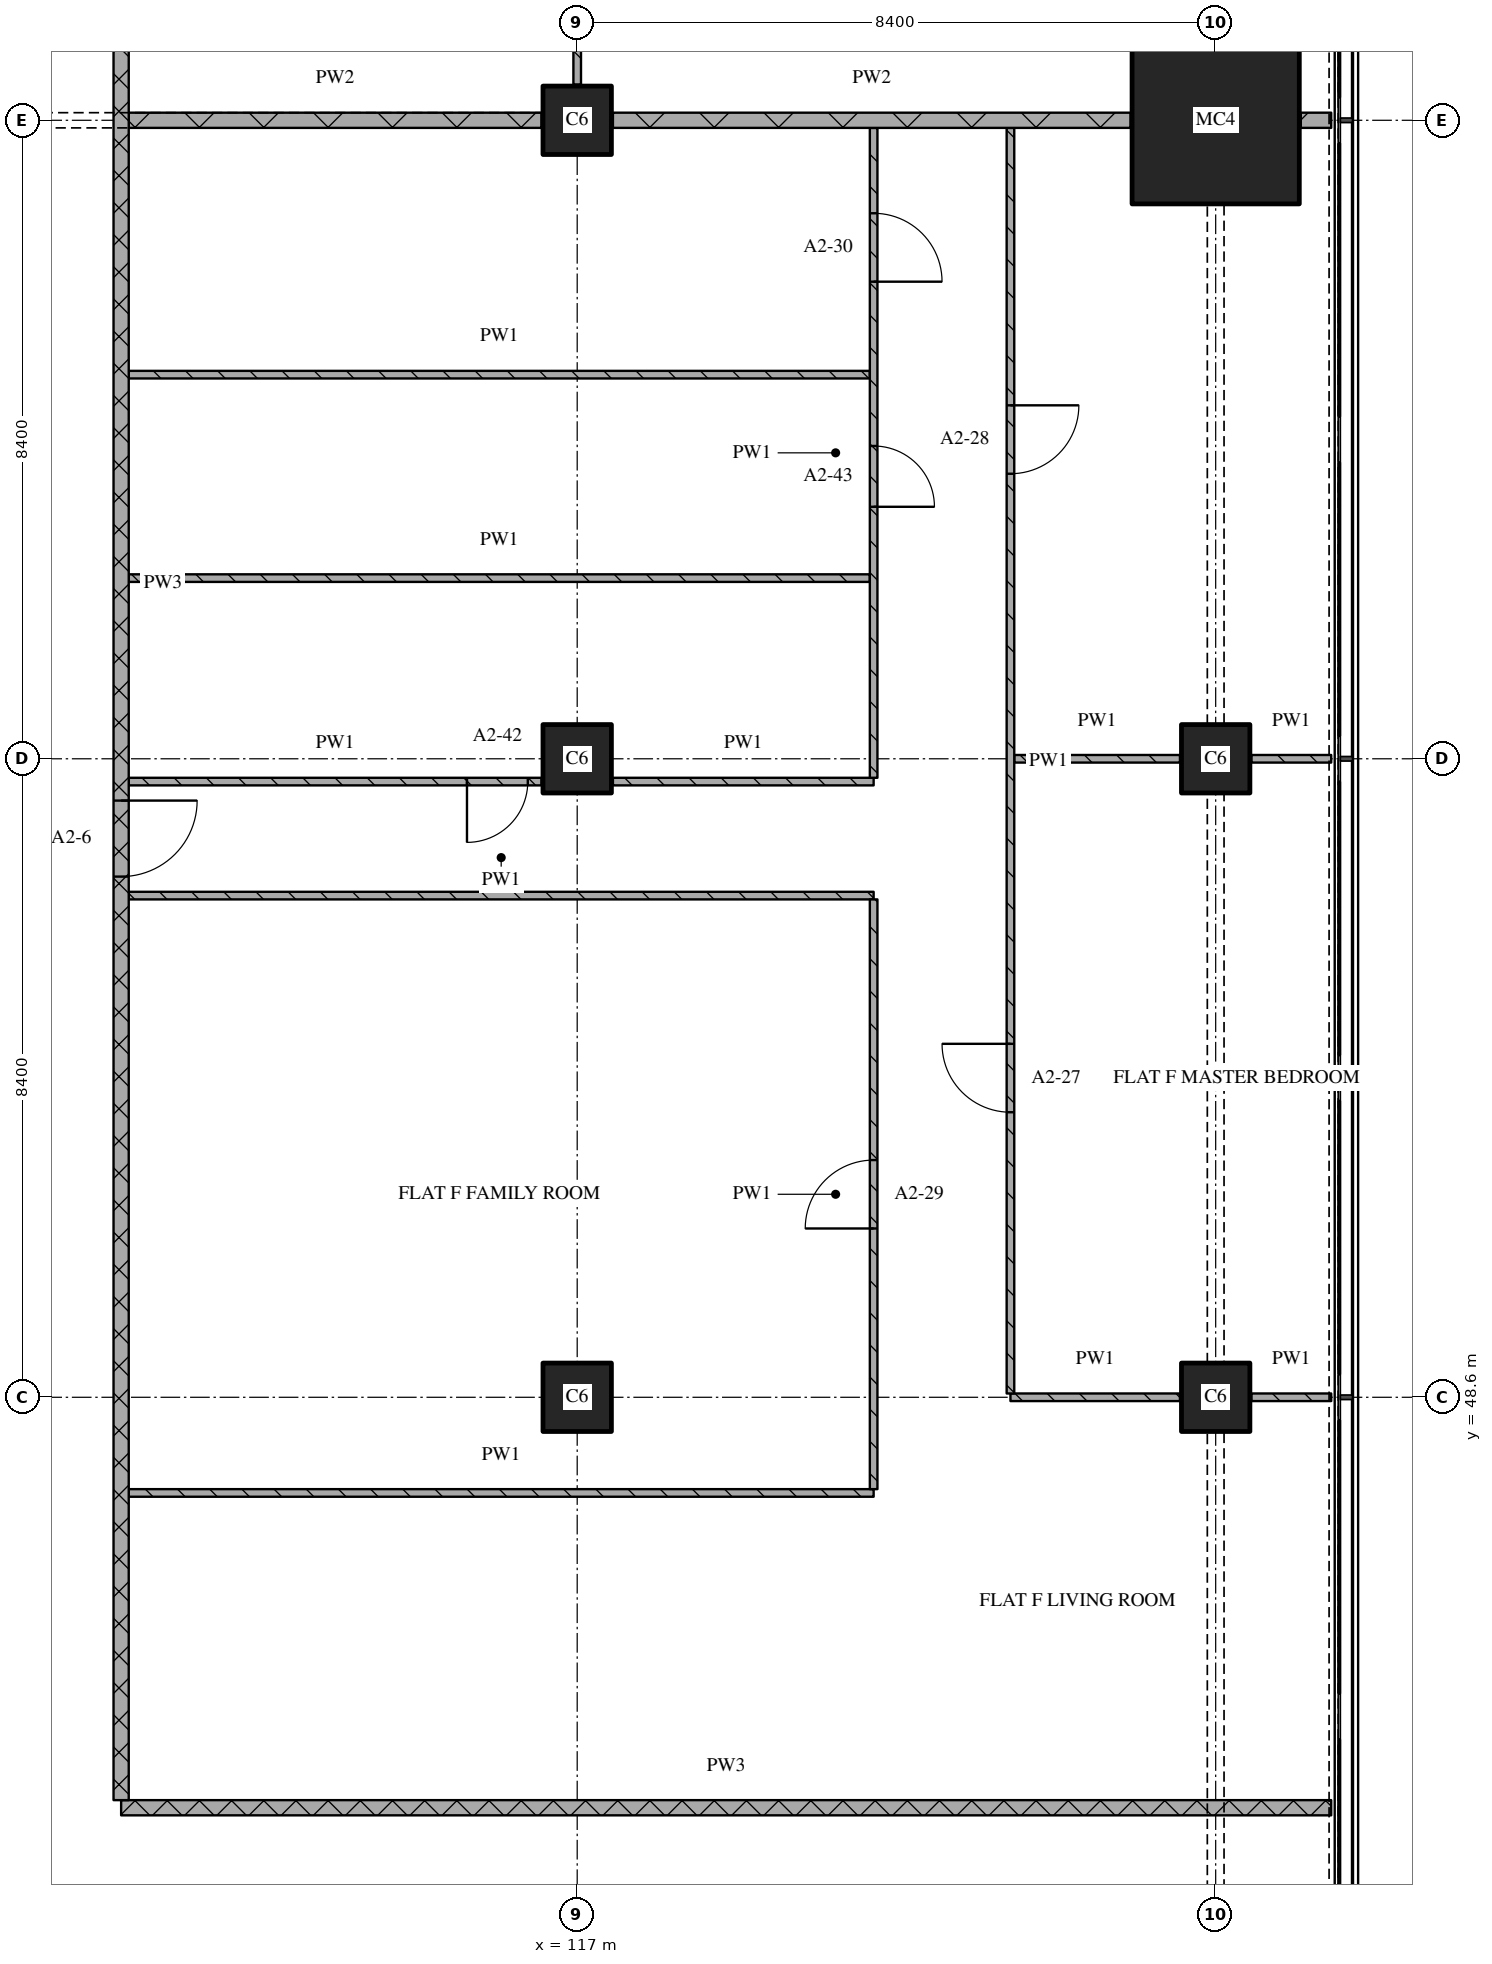
"""IFC4 building model, lengths in metres.
Left out: names, types, materials, properties, quantities, classifications, styles, units other than length and angle.
Written with IfcOpenShell. Run it as: python <this file> out.ifc"""

import sys

from ifc_helpers import new_model, si_unit, direction, frame, frame_2d, origin, origin_2d, place, context, subcontext, project, spatial, rectangle, extrude, element, fill, save


model = new_model("IFC4")
c1 = context("Model", 3, precision=1e-05, world=origin(), true_north=direction((0.0, 1.0)))
c2 = subcontext(c1, "Body", "Model", "MODEL_VIEW")
j1 = project(units=[si_unit("LENGTHUNIT", "METRE"), si_unit("PLANEANGLEUNIT", "RADIAN")], contexts=[c1])
p1 = place(None, origin())
s1 = spatial("IfcSite", under=j1, at=p1, CompositionType="ELEMENT")
p2 = place(p1, origin())
s2 = spatial("IfcBuilding", under=s1, at=p2, CompositionType="ELEMENT")
p3 = place(p2, frame((0.0, 0.0, 55.2)))
s3 = spatial("IfcBuildingStorey", under=s2, at=p3, CompositionType="ELEMENT", Elevation=55.2)
for number, where, z_axis, x_axis in (
    (1, (117.0, 48.6, 0.0), (0.0, 0.0, 1.0), (1.0, 0.0, 0.0)),
    (2, (117.0, 57.0, 0.0), (0.0, 0.0, 1.0), (1.0, 0.0, 0.0)),
    (3, (117.0, 65.4, 0.0), (0.0, 0.0, 1.0), (1.0, 0.0, 0.0)),
    (4, (125.4, 48.6, 0.0), (0.0, 0.0, 1.0), (1.0, 0.0, 0.0)),
    (5, (125.4, 57.0, 0.0), (0.0, 0.0, 1.0), (1.0, 0.0, 0.0)),
):
    element("IfcColumn", number, at=place(p3, frame(where, z_axis=z_axis, x_axis=x_axis)), inside=s3, PredefinedType="COLUMN", context=c2, shape_type="SweptSolid", body=[
        extrude(rectangle(XDim=0.9, YDim=0.9, at=origin_2d()), origin(), (0.0, 0.0, 1.0), 3.6),
    ])
p4 = place(p3, frame((125.4, 65.4, 0.0), z_axis=(0.0, 0.0, 1.0), x_axis=(1.0, 0.0, 0.0)))
e6 = element("IfcColumn", 6, at=p4, inside=s3, PredefinedType="COLUMN", context=c2, shape_type="SweptSolid", body=[
    extrude(rectangle(XDim=2.2, YDim=2.2, at=origin_2d()), origin(), (0.0, 0.0, 1.0), 3.6),
])
p5 = place(p3, frame((111.0, 43.2, 0.0), z_axis=(0.0, 0.0, 1.0), x_axis=(1.0, 0.0, 0.0)))
e7 = element("IfcWall", 7, at=p5, inside=s3, PredefinedType="PARTITIONING", context=c2, shape_type="SweptSolid", body=[
    extrude(rectangle(XDim=15.92, YDim=0.2, at=frame_2d((7.96, 0.0))), origin(), (0.0, 0.0, 1.0), 3.32),
])
p6 = place(p3, frame((111.1, 47.341, 0.0), z_axis=(0.0, 0.0, 1.0), x_axis=(1.0, 0.0, 0.0)))
e8 = element("IfcWall", 8, at=p6, inside=s3, PredefinedType="PARTITIONING", context=c2, shape_type="SweptSolid", body=[
    extrude(rectangle(XDim=9.8, YDim=0.1, at=frame_2d((4.9, 0.0))), origin(), (0.0, 0.0, 1.0), 3.32),
])
p7 = place(p3, frame((122.7, 48.6, 0.0), z_axis=(0.0, 0.0, 1.0), x_axis=(1.0, 0.0, 0.0)))
e9 = element("IfcWall", 9, at=p7, inside=s3, PredefinedType="PARTITIONING", context=c2, shape_type="SweptSolid", body=[
    extrude(rectangle(XDim=2.23, YDim=0.1, at=frame_2d((1.115, 0.0))), origin(), (0.0, 0.0, 1.0), 3.32),
])
p8 = place(p3, frame((125.87, 48.6, 0.0), z_axis=(0.0, 0.0, 1.0), x_axis=(1.0, 0.0, 0.0)))
e10 = element("IfcWall", 10, at=p8, inside=s3, PredefinedType="PARTITIONING", context=c2, shape_type="SweptSolid", body=[
    extrude(rectangle(XDim=1.05, YDim=0.1, at=frame_2d((0.525, 0.0))), origin(), (0.0, 0.0, 1.0), 3.32),
])
p9 = place(p3, frame((111.1, 55.2, 0.0), z_axis=(0.0, 0.0, 1.0), x_axis=(1.0, 0.0, 0.0)))
e11 = element("IfcWall", 11, at=p9, inside=s3, PredefinedType="PARTITIONING", context=c2, shape_type="SweptSolid", body=[
    extrude(rectangle(XDim=9.8, YDim=0.1, at=frame_2d((4.9, 0.0))), origin(), (0.0, 0.0, 1.0), 3.32),
])
p10 = place(p3, frame((111.1, 56.7, 0.0), z_axis=(0.0, 0.0, 1.0), x_axis=(1.0, 0.0, 0.0)))
e12 = element("IfcWall", 12, at=p10, inside=s3, PredefinedType="PARTITIONING", context=c2, shape_type="SweptSolid", body=[
    extrude(rectangle(XDim=5.43, YDim=0.1, at=frame_2d((2.715, 0.0))), origin(), (0.0, 0.0, 1.0), 3.32),
])
p11 = place(p10, frame((4.45, 0.0, 0.0)))
e13 = element("IfcOpeningElement", 13, at=p11, cuts=e12, PredefinedType="OPENING", context=c2, shape_type="SweptSolid", body=[
    extrude(rectangle(XDim=0.8, YDim=2.1, at=frame_2d((0.4, 1.05))), frame((0.0, 0.06, 0.0), z_axis=(0.0, -1.0, 0.0), x_axis=(1.0, 0.0, 0.0)), (0.0, 0.0, 1.0), 0.12),
])
p12 = place(p3, frame((117.47, 56.7, 0.0), z_axis=(0.0, 0.0, 1.0), x_axis=(1.0, 0.0, 0.0)))
e14 = element("IfcWall", 14, at=p12, inside=s3, PredefinedType="PARTITIONING", context=c2, shape_type="SweptSolid", body=[
    extrude(rectangle(XDim=3.43, YDim=0.1, at=frame_2d((1.715, 0.0))), origin(), (0.0, 0.0, 1.0), 3.32),
])
p13 = place(p3, frame((122.75, 57.0, 0.0), z_axis=(0.0, 0.0, 1.0), x_axis=(1.0, 0.0, 0.0)))
e15 = element("IfcWall", 15, at=p13, inside=s3, PredefinedType="PARTITIONING", context=c2, shape_type="SweptSolid", body=[
    extrude(rectangle(XDim=2.18, YDim=0.1, at=frame_2d((1.09, 0.0))), origin(), (0.0, 0.0, 1.0), 3.32),
])
p14 = place(p3, frame((125.87, 57.0, 0.0), z_axis=(0.0, 0.0, 1.0), x_axis=(1.0, 0.0, 0.0)))
e16 = element("IfcWall", 16, at=p14, inside=s3, PredefinedType="PARTITIONING", context=c2, shape_type="SweptSolid", body=[
    extrude(rectangle(XDim=1.05, YDim=0.1, at=frame_2d((0.525, 0.0))), origin(), (0.0, 0.0, 1.0), 3.32),
])
for number, where, z_axis, x_axis in (
    (17, (111.1, 59.377, 0.0), (0.0, 0.0, 1.0), (1.0, 0.0, 0.0)),
    (18, (111.1, 62.053, 0.0), (0.0, 0.0, 1.0), (1.0, 0.0, 0.0)),
):
    element("IfcWall", number, at=place(p3, frame(where, z_axis=z_axis, x_axis=x_axis)), inside=s3, PredefinedType="PARTITIONING", context=c2, shape_type="SweptSolid", body=[
        extrude(rectangle(XDim=9.75, YDim=0.1, at=frame_2d((4.875, 0.0))), origin(), (0.0, 0.0, 1.0), 3.32),
    ])
p15 = place(p3, frame((111.1, 65.4, 0.0), z_axis=(0.0, 0.0, 1.0), x_axis=(1.0, 0.0, 0.0)))
e19 = element("IfcWall", 19, at=p15, inside=s3, PredefinedType="PARTITIONING", context=c2, shape_type="SweptSolid", body=[
    extrude(rectangle(XDim=5.43, YDim=0.2, at=frame_2d((2.715, 0.0))), origin(), (0.0, 0.0, 1.0), 2.82),
])
p16 = place(p3, frame((117.47, 65.4, 0.0), z_axis=(0.0, 0.0, 1.0), x_axis=(1.0, 0.0, 0.0)))
e20 = element("IfcWall", 20, at=p16, inside=s3, PredefinedType="PARTITIONING", context=c2, shape_type="SweptSolid", body=[
    extrude(rectangle(XDim=6.81, YDim=0.2, at=frame_2d((3.405, 0.0))), origin(), (0.0, 0.0, 1.0), 3.32),
])
p17 = place(p3, frame((126.52, 65.4, 0.0), z_axis=(0.0, 0.0, 1.0), x_axis=(1.0, 0.0, 0.0)))
e21 = element("IfcWall", 21, at=p17, inside=s3, PredefinedType="PARTITIONING", context=c2, shape_type="SweptSolid", body=[
    extrude(rectangle(XDim=0.4, YDim=0.2, at=frame_2d((0.2, 0.0))), origin(), (0.0, 0.0, 1.0), 3.32),
])
p18 = place(p3, frame((111.0, 75.32, 0.0), z_axis=(0.0, 0.0, 1.0), x_axis=(0.0, -1.0, 0.0)))
e22 = element("IfcWall", 22, at=p18, inside=s3, PredefinedType="PARTITIONING", context=c2, shape_type="SweptSolid", body=[
    extrude(rectangle(XDim=32.02, YDim=0.2, at=frame_2d((16.01, 0.0))), origin(), (0.0, 0.0, 1.0), 3.32),
])
p19 = place(p18, frame((4.47, 0.0, 0.0)))
e23 = element("IfcOpeningElement", 23, at=p19, cuts=e22, PredefinedType="OPENING", context=c2, shape_type="SweptSolid", body=[
    extrude(rectangle(XDim=1.0, YDim=2.1, at=frame_2d((0.5, 1.05))), frame((0.0, 0.11, 0.0), z_axis=(0.0, -1.0, 0.0), x_axis=(1.0, 0.0, 0.0)), (0.0, 0.0, 1.0), 0.22),
])
p20 = place(p18, frame((18.87, 0.0, 0.0)))
e24 = element("IfcOpeningElement", 24, at=p20, cuts=e22, PredefinedType="OPENING", context=c2, shape_type="SweptSolid", body=[
    extrude(rectangle(XDim=1.0, YDim=2.1, at=frame_2d((0.5, 1.05))), frame((0.0, 0.11, 0.0), z_axis=(0.0, -1.0, 0.0), x_axis=(1.0, 0.0, 0.0)), (0.0, 0.0, 1.0), 0.22),
])
p21 = place(p3, frame((117.0, 65.87, 0.0), z_axis=(0.0, 0.0, 1.0), x_axis=(0.0, 1.0, 0.0)))
e25 = element("IfcWall", 25, at=p21, inside=s3, PredefinedType="PARTITIONING", context=c2, shape_type="SweptSolid", body=[
    extrude(rectangle(XDim=3.68, YDim=0.1, at=frame_2d((1.84, 0.0))), origin(), (0.0, 0.0, 1.0), 3.32),
])
p22 = place(p21, frame((1.23, 0.0, 0.0)))
e26 = element("IfcOpeningElement", 26, at=p22, cuts=e25, PredefinedType="OPENING", context=c2, shape_type="SweptSolid", body=[
    extrude(rectangle(XDim=0.8, YDim=2.1, at=frame_2d((0.4, 1.05))), frame((0.0, 0.06, 0.0), z_axis=(0.0, -1.0, 0.0), x_axis=(1.0, 0.0, 0.0)), (0.0, 0.0, 1.0), 0.12),
])
p23 = place(p3, frame((120.9, 47.391, 0.0), z_axis=(0.0, 0.0, 1.0), x_axis=(0.0, 1.0, 0.0)))
e27 = element("IfcWall", 27, at=p23, inside=s3, PredefinedType="PARTITIONING", context=c2, shape_type="SweptSolid", body=[
    extrude(rectangle(XDim=7.759, YDim=0.1, at=frame_2d((3.879, 0.0))), origin(), (0.0, 0.0, 1.0), 3.32),
])
p24 = place(p23, frame((3.429, 0.0, 0.0)))
e28 = element("IfcOpeningElement", 28, at=p24, cuts=e27, PredefinedType="OPENING", context=c2, shape_type="SweptSolid", body=[
    extrude(rectangle(XDim=0.9, YDim=2.1, at=frame_2d((0.45, 1.05))), frame((0.0, 0.06, 0.0), z_axis=(0.0, -1.0, 0.0), x_axis=(1.0, 0.0, 0.0)), (0.0, 0.0, 1.0), 0.12),
])
p25 = place(p3, frame((120.9, 56.75, 0.0), z_axis=(0.0, 0.0, 1.0), x_axis=(0.0, 1.0, 0.0)))
e29 = element("IfcWall", 29, at=p25, inside=s3, PredefinedType="PARTITIONING", context=c2, shape_type="SweptSolid", body=[
    extrude(rectangle(XDim=8.55, YDim=0.1, at=frame_2d((4.275, 0.0))), origin(), (0.0, 0.0, 1.0), 3.32),
])
p26 = place(p25, frame((3.565, 0.0, 0.0)))
e30 = element("IfcOpeningElement", 30, at=p26, cuts=e29, PredefinedType="OPENING", context=c2, shape_type="SweptSolid", body=[
    extrude(rectangle(XDim=0.8, YDim=2.1, at=frame_2d((0.4, 1.05))), frame((0.0, 0.06, 0.0), z_axis=(0.0, -1.0, 0.0), x_axis=(1.0, 0.0, 0.0)), (0.0, 0.0, 1.0), 0.12),
])
p27 = place(p25, frame((6.527, 0.0, 0.0)))
e31 = element("IfcOpeningElement", 31, at=p27, cuts=e29, PredefinedType="OPENING", context=c2, shape_type="SweptSolid", body=[
    extrude(rectangle(XDim=0.9, YDim=2.1, at=frame_2d((0.45, 1.05))), frame((0.0, 0.06, 0.0), z_axis=(0.0, -1.0, 0.0), x_axis=(1.0, 0.0, 0.0)), (0.0, 0.0, 1.0), 0.12),
])
p28 = place(p3, frame((122.7, 65.3, 0.0), z_axis=(0.0, 0.0, 1.0), x_axis=(0.0, -1.0, 0.0)))
e32 = element("IfcWall", 32, at=p28, inside=s3, PredefinedType="PARTITIONING", context=c2, shape_type="SweptSolid", body=[
    extrude(rectangle(XDim=16.65, YDim=0.1, at=frame_2d((8.325, 0.0))), origin(), (0.0, 0.0, 1.0), 3.32),
])
p29 = place(p28, frame((3.65, 0.0, 0.0)))
e33 = element("IfcOpeningElement", 33, at=p29, cuts=e32, PredefinedType="OPENING", context=c2, shape_type="SweptSolid", body=[
    extrude(rectangle(XDim=0.9, YDim=2.1, at=frame_2d((0.45, 1.05))), frame((0.0, 0.06, 0.0), z_axis=(0.0, -1.0, 0.0), x_axis=(1.0, 0.0, 0.0)), (0.0, 0.0, 1.0), 0.12),
])
p30 = place(p28, frame((12.05, 0.0, 0.0)))
e34 = element("IfcOpeningElement", 34, at=p30, cuts=e32, PredefinedType="OPENING", context=c2, shape_type="SweptSolid", body=[
    extrude(rectangle(XDim=0.9, YDim=2.1, at=frame_2d((0.45, 1.05))), frame((0.0, 0.06, 0.0), z_axis=(0.0, -1.0, 0.0), x_axis=(1.0, 0.0, 0.0)), (0.0, 0.0, 1.0), 0.12),
])
p31 = place(p11, origin())
e35 = element("IfcDoor", 35, at=p31, inside=s3, OperationType="SINGLE_SWING_RIGHT", PredefinedType="DOOR", context=c2, shape_type="SweptSolid", body=[
    extrude(rectangle(XDim=0.8, YDim=2.1, at=frame_2d((0.4, 1.05))), frame((0.0, 0.025, 0.0), z_axis=(0.0, -1.0, 0.0), x_axis=(1.0, 0.0, 0.0)), (0.0, 0.0, 1.0), 0.05),
])
fill(e13, e35)
p32 = place(p20, origin())
e36 = element("IfcDoor", 36, at=p32, inside=s3, OperationType="SINGLE_SWING_LEFT", PredefinedType="DOOR", context=c2, shape_type="SweptSolid", body=[
    extrude(rectangle(XDim=1.0, YDim=2.1, at=frame_2d((0.5, 1.05))), frame((0.0, 0.025, 0.0), z_axis=(0.0, -1.0, 0.0), x_axis=(1.0, 0.0, 0.0)), (0.0, 0.0, 1.0), 0.05),
])
fill(e24, e36)
p33 = place(p24, origin())
e37 = element("IfcDoor", 37, at=p33, inside=s3, OperationType="SINGLE_SWING_LEFT", PredefinedType="DOOR", context=c2, shape_type="SweptSolid", body=[
    extrude(rectangle(XDim=0.9, YDim=2.1, at=frame_2d((0.45, 1.05))), frame((0.0, 0.025, 0.0), z_axis=(0.0, -1.0, 0.0), x_axis=(1.0, 0.0, 0.0)), (0.0, 0.0, 1.0), 0.05),
])
fill(e28, e37)
p34 = place(p26, origin())
e38 = element("IfcDoor", 38, at=p34, inside=s3, OperationType="SINGLE_SWING_RIGHT", PredefinedType="DOOR", context=c2, shape_type="SweptSolid", body=[
    extrude(rectangle(XDim=0.8, YDim=2.1, at=frame_2d((0.4, 1.05))), frame((0.0, 0.025, 0.0), z_axis=(0.0, -1.0, 0.0), x_axis=(1.0, 0.0, 0.0)), (0.0, 0.0, 1.0), 0.05),
])
fill(e30, e38)
p35 = place(p27, origin())
e39 = element("IfcDoor", 39, at=p35, inside=s3, OperationType="SINGLE_SWING_RIGHT", PredefinedType="DOOR", context=c2, shape_type="SweptSolid", body=[
    extrude(rectangle(XDim=0.9, YDim=2.1, at=frame_2d((0.45, 1.05))), frame((0.0, 0.025, 0.0), z_axis=(0.0, -1.0, 0.0), x_axis=(1.0, 0.0, 0.0)), (0.0, 0.0, 1.0), 0.05),
])
fill(e31, e39)
p36 = place(p29, origin())
e40 = element("IfcDoor", 40, at=p36, inside=s3, OperationType="SINGLE_SWING_LEFT", PredefinedType="DOOR", context=c2, shape_type="SweptSolid", body=[
    extrude(rectangle(XDim=0.9, YDim=2.1, at=frame_2d((0.45, 1.05))), frame((0.0, 0.025, 0.0), z_axis=(0.0, -1.0, 0.0), x_axis=(1.0, 0.0, 0.0)), (0.0, 0.0, 1.0), 0.05),
])
fill(e33, e40)
p37 = place(p30, origin())
e41 = element("IfcDoor", 41, at=p37, inside=s3, OperationType="SINGLE_SWING_RIGHT", PredefinedType="DOOR", context=c2, shape_type="SweptSolid", body=[
    extrude(rectangle(XDim=0.9, YDim=2.1, at=frame_2d((0.45, 1.05))), frame((0.0, 0.025, 0.0), z_axis=(0.0, -1.0, 0.0), x_axis=(1.0, 0.0, 0.0)), (0.0, 0.0, 1.0), 0.05),
])
fill(e34, e41)
save(model, sys.argv[1])
